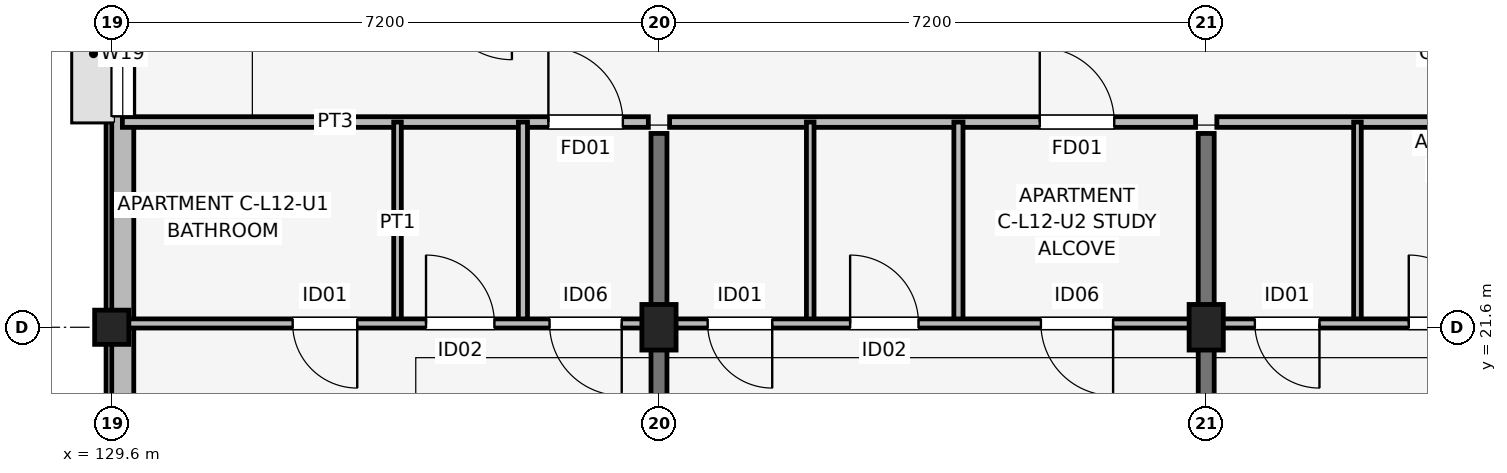
"""IFC4 building model, lengths in metres.
Left out: names, types, materials, properties, quantities, classifications, styles, units other than length and angle.
Written with IfcOpenShell. Run it as: python <this file> out.ifc"""

import sys

from ifc_helpers import new_model, si_unit, direction, frame, frame_2d, origin, origin_2d, place, context, subcontext, project, spatial, rectangle, extrude, element, fill, save


model = new_model("IFC4")
c1 = context("Model", 3, precision=1e-05, world=origin(), true_north=direction((0.0, 1.0)))
c2 = subcontext(c1, "Body", "Model", "MODEL_VIEW")
j1 = project(units=[si_unit("LENGTHUNIT", "METRE"), si_unit("PLANEANGLEUNIT", "RADIAN")], contexts=[c1])
p1 = place(None, origin())
s1 = spatial("IfcSite", under=j1, at=p1, CompositionType="ELEMENT")
p2 = place(p1, origin())
s2 = spatial("IfcBuilding", under=s1, at=p2, CompositionType="ELEMENT")
p3 = place(p2, frame((0.0, 0.0, 40.2)))
s3 = spatial("IfcBuildingStorey", under=s2, at=p3, CompositionType="ELEMENT", Elevation=40.2)
p4 = place(p3, frame((129.6, 21.6, 0.0), z_axis=(0.0, 0.0, 1.0), x_axis=(1.0, 0.0, 0.0)))
e1 = element("IfcColumn", 1, at=p4, inside=s3, PredefinedType="COLUMN", context=c2, shape_type="SweptSolid", body=[
    extrude(rectangle(XDim=0.45, YDim=0.45, at=origin_2d()), origin(), (0.0, 0.0, 1.0), 3.15),
])
for number, where, z_axis, x_axis in (
    (2, (136.8, 21.6, 0.0), (0.0, 0.0, 1.0), (1.0, 0.0, 0.0)),
    (3, (144.0, 21.6, 0.0), (0.0, 0.0, 1.0), (1.0, 0.0, 0.0)),
):
    element("IfcColumn", number, at=place(p3, frame(where, z_axis=z_axis, x_axis=x_axis)), inside=s3, PredefinedType="COLUMN", context=c2, shape_type="SweptSolid", body=[
        extrude(rectangle(XDim=0.45, YDim=0.6, at=origin_2d()), origin(), (0.0, 0.0, 1.0), 3.15),
    ])
for number, where, z_axis, x_axis in (
    (4, (136.8, 14.75, 0.0), (0.0, 0.0, 1.0), (0.0, 1.0, 0.0)),
    (5, (144.0, 14.75, 0.0), (0.0, 0.0, 1.0), (0.0, 1.0, 0.0)),
):
    element("IfcWall", number, at=place(p3, frame(where, z_axis=z_axis, x_axis=x_axis)), inside=s3, PredefinedType="SHEAR", context=c2, shape_type="SweptSolid", body=[
        extrude(rectangle(XDim=9.4, YDim=0.21, at=frame_2d((4.7, 0.0))), origin(), (0.0, 0.0, 1.0), 3.15),
    ])
p5 = place(p3, frame((129.745, 33.0, 0.0), z_axis=(0.0, 0.0, 1.0), x_axis=(0.0, -1.0, 0.0)))
e6 = element("IfcWall", 6, at=p5, inside=s3, PredefinedType="SOLIDWALL", context=c2, shape_type="SweptSolid", body=[
    extrude(rectangle(XDim=15.6, YDim=0.29, at=frame_2d((7.8, 0.0))), origin(), (0.0, 0.0, 1.0), 2.51),
])
p6 = place(p5, frame((6.975, 0.0, 1.05)))
e7 = element("IfcOpeningElement", 7, at=p6, cuts=e6, PredefinedType="OPENING", context=c2, shape_type="SweptSolid", body=[
    extrude(rectangle(XDim=1.65, YDim=1.15, at=frame_2d((0.825, 0.575))), frame((0.0, 0.155, 0.0), z_axis=(0.0, -1.0, 0.0), x_axis=(1.0, 0.0, 0.0)), (0.0, 0.0, 1.0), 0.31),
])
p7 = place(p5, frame((12.817, 0.0, 0.75)))
e8 = element("IfcOpeningElement", 8, at=p7, cuts=e6, PredefinedType="OPENING", context=c2, shape_type="SweptSolid", body=[
    extrude(rectangle(XDim=1.42, YDim=1.6, at=frame_2d((0.71, 0.8))), frame((0.0, 0.155, 0.0), z_axis=(0.0, -1.0, 0.0), x_axis=(1.0, 0.0, 0.0)), (0.0, 0.0, 1.0), 0.31),
])
p8 = place(p3, frame((129.74, 24.3, 0.0), z_axis=(0.0, 0.0, 1.0), x_axis=(1.0, 0.0, 0.0)))
e9 = element("IfcWall", 9, at=p8, inside=s3, PredefinedType="PARTITIONING", context=c2, shape_type="SweptSolid", body=[
    extrude(rectangle(XDim=6.92, YDim=0.14, at=frame_2d((3.46, 0.0))), origin(), (0.0, 0.0, 1.0), 2.38),
])
p9 = place(p8, frame((5.605, 0.0, 0.0)))
e10 = element("IfcOpeningElement", 10, at=p9, cuts=e9, PredefinedType="OPENING", context=c2, shape_type="SweptSolid", body=[
    extrude(rectangle(XDim=0.98, YDim=2.1, at=frame_2d((0.49, 1.05))), frame((0.0, 0.08, 0.0), z_axis=(0.0, -1.0, 0.0), x_axis=(1.0, 0.0, 0.0)), (0.0, 0.0, 1.0), 0.16),
])
p10 = place(p3, frame((133.36, 21.65, 0.0), z_axis=(0.0, 0.0, 1.0), x_axis=(0.0, 1.0, 0.0)))
e11 = element("IfcWall", 11, at=p10, inside=s3, PredefinedType="PARTITIONING", context=c2, shape_type="SweptSolid", body=[
    extrude(rectangle(XDim=2.65, YDim=0.1, at=frame_2d((1.325, 0.0))), origin(), (0.0, 0.0, 1.0), 2.38),
])
p11 = place(p3, frame((135.01, 21.65, 0.0), z_axis=(0.0, 0.0, 1.0), x_axis=(0.0, 1.0, 0.0)))
e12 = element("IfcWall", 12, at=p11, inside=s3, PredefinedType="PARTITIONING", context=c2, shape_type="SweptSolid", body=[
    extrude(rectangle(XDim=2.65, YDim=0.12, at=frame_2d((1.325, 0.0))), origin(), (0.0, 0.0, 1.0), 2.38),
])
p12 = place(p3, frame((129.74, 21.65, 0.0), z_axis=(0.0, 0.0, 1.0), x_axis=(1.0, 0.0, 0.0)))
e13 = element("IfcWall", 13, at=p12, inside=s3, PredefinedType="PARTITIONING", context=c2, shape_type="SweptSolid", body=[
    extrude(rectangle(XDim=6.92, YDim=0.12, at=frame_2d((3.46, 0.0))), origin(), (0.0, 0.0, 1.0), 2.38),
])
p13 = place(p12, frame((3.09, 0.0, 0.0), z_axis=(0.0, 0.0, 1.0), x_axis=(-1.0, 0.0, 0.0)))
e14 = element("IfcOpeningElement", 14, at=p13, cuts=e13, PredefinedType="OPENING", context=c2, shape_type="SweptSolid", body=[
    extrude(rectangle(XDim=0.85, YDim=2.08, at=frame_2d((0.425, 1.04))), frame((0.0, 0.07, 0.0), z_axis=(0.0, -1.0, 0.0), x_axis=(1.0, 0.0, 0.0)), (0.0, 0.0, 1.0), 0.14),
])
p14 = place(p12, frame((3.995, 0.0, 0.0)))
e15 = element("IfcOpeningElement", 15, at=p14, cuts=e13, PredefinedType="OPENING", context=c2, shape_type="SweptSolid", body=[
    extrude(rectangle(XDim=0.9, YDim=2.08, at=frame_2d((0.45, 1.04))), frame((0.0, 0.07, 0.0), z_axis=(0.0, -1.0, 0.0), x_axis=(1.0, 0.0, 0.0)), (0.0, 0.0, 1.0), 0.14),
])
p15 = place(p12, frame((6.57, 0.0, 0.0), z_axis=(0.0, 0.0, 1.0), x_axis=(-1.0, 0.0, 0.0)))
e16 = element("IfcOpeningElement", 16, at=p15, cuts=e13, PredefinedType="OPENING", context=c2, shape_type="SweptSolid", body=[
    extrude(rectangle(XDim=0.95, YDim=2.08, at=frame_2d((0.475, 1.04))), frame((0.0, 0.07, 0.0), z_axis=(0.0, -1.0, 0.0), x_axis=(1.0, 0.0, 0.0)), (0.0, 0.0, 1.0), 0.14),
])
p16 = place(p3, frame((136.94, 24.3, 0.0), z_axis=(0.0, 0.0, 1.0), x_axis=(1.0, 0.0, 0.0)))
e17 = element("IfcWall", 17, at=p16, inside=s3, PredefinedType="PARTITIONING", context=c2, shape_type="SweptSolid", body=[
    extrude(rectangle(XDim=6.92, YDim=0.14, at=frame_2d((3.46, 0.0))), origin(), (0.0, 0.0, 1.0), 2.38),
])
p17 = place(p16, frame((4.87, 0.0, 0.0)))
e18 = element("IfcOpeningElement", 18, at=p17, cuts=e17, PredefinedType="OPENING", context=c2, shape_type="SweptSolid", body=[
    extrude(rectangle(XDim=0.98, YDim=2.1, at=frame_2d((0.49, 1.05))), frame((0.0, 0.08, 0.0), z_axis=(0.0, -1.0, 0.0), x_axis=(1.0, 0.0, 0.0)), (0.0, 0.0, 1.0), 0.16),
])
p18 = place(p3, frame((138.79, 21.65, 0.0), z_axis=(0.0, 0.0, 1.0), x_axis=(0.0, 1.0, 0.0)))
e19 = element("IfcWall", 19, at=p18, inside=s3, PredefinedType="PARTITIONING", context=c2, shape_type="SweptSolid", body=[
    extrude(rectangle(XDim=2.65, YDim=0.1, at=frame_2d((1.325, 0.0))), origin(), (0.0, 0.0, 1.0), 2.38),
])
p19 = place(p3, frame((140.74, 21.65, 0.0), z_axis=(0.0, 0.0, 1.0), x_axis=(0.0, 1.0, 0.0)))
e20 = element("IfcWall", 20, at=p19, inside=s3, PredefinedType="PARTITIONING", context=c2, shape_type="SweptSolid", body=[
    extrude(rectangle(XDim=2.65, YDim=0.12, at=frame_2d((1.325, 0.0))), origin(), (0.0, 0.0, 1.0), 2.38),
])
p20 = place(p3, frame((136.94, 21.65, 0.0), z_axis=(0.0, 0.0, 1.0), x_axis=(1.0, 0.0, 0.0)))
e21 = element("IfcWall", 21, at=p20, inside=s3, PredefinedType="PARTITIONING", context=c2, shape_type="SweptSolid", body=[
    extrude(rectangle(XDim=6.92, YDim=0.12, at=frame_2d((3.46, 0.0))), origin(), (0.0, 0.0, 1.0), 2.38),
])
p21 = place(p20, frame((1.35, 0.0, 0.0), z_axis=(0.0, 0.0, 1.0), x_axis=(-1.0, 0.0, 0.0)))
e22 = element("IfcOpeningElement", 22, at=p21, cuts=e21, PredefinedType="OPENING", context=c2, shape_type="SweptSolid", body=[
    extrude(rectangle(XDim=0.85, YDim=2.08, at=frame_2d((0.425, 1.04))), frame((0.0, 0.07, 0.0), z_axis=(0.0, -1.0, 0.0), x_axis=(1.0, 0.0, 0.0)), (0.0, 0.0, 1.0), 0.14),
])
p22 = place(p20, frame((2.375, 0.0, 0.0)))
e23 = element("IfcOpeningElement", 23, at=p22, cuts=e21, PredefinedType="OPENING", context=c2, shape_type="SweptSolid", body=[
    extrude(rectangle(XDim=0.9, YDim=2.08, at=frame_2d((0.45, 1.04))), frame((0.0, 0.07, 0.0), z_axis=(0.0, -1.0, 0.0), x_axis=(1.0, 0.0, 0.0)), (0.0, 0.0, 1.0), 0.14),
])
p23 = place(p20, frame((5.835, 0.0, 0.0), z_axis=(0.0, 0.0, 1.0), x_axis=(-1.0, 0.0, 0.0)))
e24 = element("IfcOpeningElement", 24, at=p23, cuts=e21, PredefinedType="OPENING", context=c2, shape_type="SweptSolid", body=[
    extrude(rectangle(XDim=0.95, YDim=2.08, at=frame_2d((0.475, 1.04))), frame((0.0, 0.07, 0.0), z_axis=(0.0, -1.0, 0.0), x_axis=(1.0, 0.0, 0.0)), (0.0, 0.0, 1.0), 0.14),
])
p24 = place(p3, frame((144.14, 24.3, 0.0), z_axis=(0.0, 0.0, 1.0), x_axis=(1.0, 0.0, 0.0)))
e25 = element("IfcWall", 25, at=p24, inside=s3, PredefinedType="PARTITIONING", context=c2, shape_type="SweptSolid", body=[
    extrude(rectangle(XDim=6.92, YDim=0.14, at=frame_2d((3.46, 0.0))), origin(), (0.0, 0.0, 1.0), 2.38),
])
p25 = place(p24, frame((5.02, 0.0, 0.0)))
e26 = element("IfcOpeningElement", 26, at=p25, cuts=e25, PredefinedType="OPENING", context=c2, shape_type="SweptSolid", body=[
    extrude(rectangle(XDim=0.98, YDim=2.1, at=frame_2d((0.49, 1.05))), frame((0.0, 0.08, 0.0), z_axis=(0.0, -1.0, 0.0), x_axis=(1.0, 0.0, 0.0)), (0.0, 0.0, 1.0), 0.16),
])
p26 = place(p3, frame((145.99, 21.65, 0.0), z_axis=(0.0, 0.0, 1.0), x_axis=(0.0, 1.0, 0.0)))
e27 = element("IfcWall", 27, at=p26, inside=s3, PredefinedType="PARTITIONING", context=c2, shape_type="SweptSolid", body=[
    extrude(rectangle(XDim=2.65, YDim=0.1, at=frame_2d((1.325, 0.0))), origin(), (0.0, 0.0, 1.0), 2.38),
])
p27 = place(p3, frame((144.14, 21.65, 0.0), z_axis=(0.0, 0.0, 1.0), x_axis=(1.0, 0.0, 0.0)))
e28 = element("IfcWall", 28, at=p27, inside=s3, PredefinedType="PARTITIONING", context=c2, shape_type="SweptSolid", body=[
    extrude(rectangle(XDim=6.92, YDim=0.12, at=frame_2d((3.46, 0.0))), origin(), (0.0, 0.0, 1.0), 2.38),
])
p28 = place(p27, frame((1.35, 0.0, 0.0), z_axis=(0.0, 0.0, 1.0), x_axis=(-1.0, 0.0, 0.0)))
e29 = element("IfcOpeningElement", 29, at=p28, cuts=e28, PredefinedType="OPENING", context=c2, shape_type="SweptSolid", body=[
    extrude(rectangle(XDim=0.85, YDim=2.08, at=frame_2d((0.425, 1.04))), frame((0.0, 0.07, 0.0), z_axis=(0.0, -1.0, 0.0), x_axis=(1.0, 0.0, 0.0)), (0.0, 0.0, 1.0), 0.14),
])
p29 = place(p27, frame((2.525, 0.0, 0.0)))
e30 = element("IfcOpeningElement", 30, at=p29, cuts=e28, PredefinedType="OPENING", context=c2, shape_type="SweptSolid", body=[
    extrude(rectangle(XDim=0.9, YDim=2.08, at=frame_2d((0.45, 1.04))), frame((0.0, 0.07, 0.0), z_axis=(0.0, -1.0, 0.0), x_axis=(1.0, 0.0, 0.0)), (0.0, 0.0, 1.0), 0.14),
])
p30 = place(p27, frame((5.985, 0.0, 0.0), z_axis=(0.0, 0.0, 1.0), x_axis=(-1.0, 0.0, 0.0)))
e31 = element("IfcOpeningElement", 31, at=p30, cuts=e28, PredefinedType="OPENING", context=c2, shape_type="SweptSolid", body=[
    extrude(rectangle(XDim=0.95, YDim=2.08, at=frame_2d((0.475, 1.04))), frame((0.0, 0.07, 0.0), z_axis=(0.0, -1.0, 0.0), x_axis=(1.0, 0.0, 0.0)), (0.0, 0.0, 1.0), 0.14),
])
p31 = place(p6, origin())
e32 = element("IfcWindow", 32, at=p31, inside=s3, PartitioningType="SINGLE_PANEL", PredefinedType="WINDOW", context=c2, shape_type="SweptSolid", body=[
    extrude(rectangle(XDim=1.65, YDim=1.15, at=frame_2d((0.825, 0.575))), frame((0.0, 0.03, 0.0), z_axis=(0.0, -1.0, 0.0), x_axis=(1.0, 0.0, 0.0)), (0.0, 0.0, 1.0), 0.06),
])
fill(e7, e32)
p32 = place(p9, origin())
e33 = element("IfcDoor", 33, at=p32, inside=s3, OperationType="SINGLE_SWING_LEFT", PredefinedType="DOOR", context=c2, shape_type="SweptSolid", body=[
    extrude(rectangle(XDim=0.98, YDim=2.1, at=frame_2d((0.49, 1.05))), frame((0.0, 0.025, 0.0), z_axis=(0.0, -1.0, 0.0), x_axis=(1.0, 0.0, 0.0)), (0.0, 0.0, 1.0), 0.05),
])
fill(e10, e33)
p33 = place(p13, origin())
e34 = element("IfcDoor", 34, at=p33, inside=s3, OperationType="SINGLE_SWING_RIGHT", PredefinedType="DOOR", context=c2, shape_type="SweptSolid", body=[
    extrude(rectangle(XDim=0.85, YDim=2.08, at=frame_2d((0.425, 1.04))), frame((0.0, 0.025, 0.0), z_axis=(0.0, -1.0, 0.0), x_axis=(1.0, 0.0, 0.0)), (0.0, 0.0, 1.0), 0.05),
])
fill(e14, e34)
p34 = place(p14, origin())
e35 = element("IfcDoor", 35, at=p34, inside=s3, OperationType="SINGLE_SWING_LEFT", PredefinedType="DOOR", context=c2, shape_type="SweptSolid", body=[
    extrude(rectangle(XDim=0.9, YDim=2.08, at=frame_2d((0.45, 1.04))), frame((0.0, 0.025, 0.0), z_axis=(0.0, -1.0, 0.0), x_axis=(1.0, 0.0, 0.0)), (0.0, 0.0, 1.0), 0.05),
])
fill(e15, e35)
p35 = place(p15, origin())
e36 = element("IfcDoor", 36, at=p35, inside=s3, OperationType="SINGLE_SWING_RIGHT", PredefinedType="DOOR", context=c2, shape_type="SweptSolid", body=[
    extrude(rectangle(XDim=0.95, YDim=2.08, at=frame_2d((0.475, 1.04))), frame((0.0, 0.025, 0.0), z_axis=(0.0, -1.0, 0.0), x_axis=(1.0, 0.0, 0.0)), (0.0, 0.0, 1.0), 0.05),
])
fill(e16, e36)
p36 = place(p17, origin())
e37 = element("IfcDoor", 37, at=p36, inside=s3, OperationType="SINGLE_SWING_LEFT", PredefinedType="DOOR", context=c2, shape_type="SweptSolid", body=[
    extrude(rectangle(XDim=0.98, YDim=2.1, at=frame_2d((0.49, 1.05))), frame((0.0, 0.025, 0.0), z_axis=(0.0, -1.0, 0.0), x_axis=(1.0, 0.0, 0.0)), (0.0, 0.0, 1.0), 0.05),
])
fill(e18, e37)
p37 = place(p21, origin())
e38 = element("IfcDoor", 38, at=p37, inside=s3, OperationType="SINGLE_SWING_RIGHT", PredefinedType="DOOR", context=c2, shape_type="SweptSolid", body=[
    extrude(rectangle(XDim=0.85, YDim=2.08, at=frame_2d((0.425, 1.04))), frame((0.0, 0.025, 0.0), z_axis=(0.0, -1.0, 0.0), x_axis=(1.0, 0.0, 0.0)), (0.0, 0.0, 1.0), 0.05),
])
fill(e22, e38)
p38 = place(p22, origin())
e39 = element("IfcDoor", 39, at=p38, inside=s3, OperationType="SINGLE_SWING_LEFT", PredefinedType="DOOR", context=c2, shape_type="SweptSolid", body=[
    extrude(rectangle(XDim=0.9, YDim=2.08, at=frame_2d((0.45, 1.04))), frame((0.0, 0.025, 0.0), z_axis=(0.0, -1.0, 0.0), x_axis=(1.0, 0.0, 0.0)), (0.0, 0.0, 1.0), 0.05),
])
fill(e23, e39)
p39 = place(p23, origin())
e40 = element("IfcDoor", 40, at=p39, inside=s3, OperationType="SINGLE_SWING_RIGHT", PredefinedType="DOOR", context=c2, shape_type="SweptSolid", body=[
    extrude(rectangle(XDim=0.95, YDim=2.08, at=frame_2d((0.475, 1.04))), frame((0.0, 0.025, 0.0), z_axis=(0.0, -1.0, 0.0), x_axis=(1.0, 0.0, 0.0)), (0.0, 0.0, 1.0), 0.05),
])
fill(e24, e40)
p40 = place(p28, origin())
e41 = element("IfcDoor", 41, at=p40, inside=s3, OperationType="SINGLE_SWING_RIGHT", PredefinedType="DOOR", context=c2, shape_type="SweptSolid", body=[
    extrude(rectangle(XDim=0.85, YDim=2.08, at=frame_2d((0.425, 1.04))), frame((0.0, 0.025, 0.0), z_axis=(0.0, -1.0, 0.0), x_axis=(1.0, 0.0, 0.0)), (0.0, 0.0, 1.0), 0.05),
])
fill(e29, e41)
p41 = place(p29, origin())
e42 = element("IfcDoor", 42, at=p41, inside=s3, OperationType="SINGLE_SWING_LEFT", PredefinedType="DOOR", context=c2, shape_type="SweptSolid", body=[
    extrude(rectangle(XDim=0.9, YDim=2.08, at=frame_2d((0.45, 1.04))), frame((0.0, 0.025, 0.0), z_axis=(0.0, -1.0, 0.0), x_axis=(1.0, 0.0, 0.0)), (0.0, 0.0, 1.0), 0.05),
])
fill(e30, e42)
save(model, sys.argv[1])
